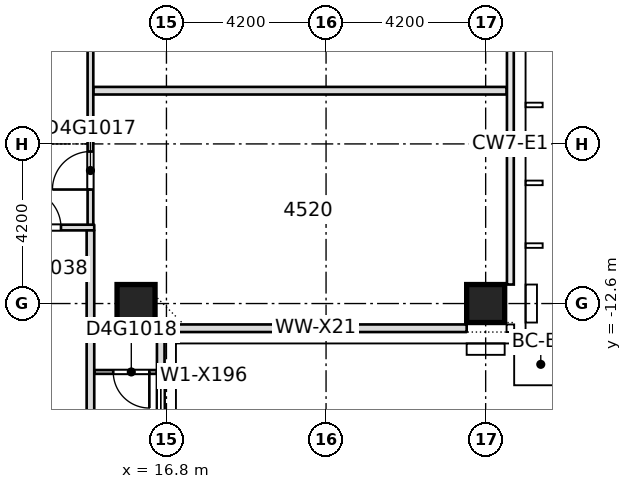
"""IFC4 building model, lengths in metres.
Left out: names, types, materials, properties, quantities, classifications, styles, units other than length and angle.
Written with IfcOpenShell. Run it as: python <this file> out.ifc"""

import sys

from ifc_helpers import new_model, si_unit, direction, frame, frame_2d, origin, origin_2d, place, context, subcontext, project, spatial, rectangle, extrude, element, fill, save


model = new_model("IFC4")
c1 = context("Model", 3, precision=1e-05, world=origin(), true_north=direction((0.0, 1.0)))
c2 = subcontext(c1, "Body", "Model", "MODEL_VIEW")
j1 = project(units=[si_unit("LENGTHUNIT", "METRE"), si_unit("PLANEANGLEUNIT", "RADIAN")], contexts=[c1])
p1 = place(None, origin())
s1 = spatial("IfcSite", under=j1, at=p1, CompositionType="ELEMENT")
p2 = place(p1, origin())
s2 = spatial("IfcBuilding", under=s1, at=p2, CompositionType="ELEMENT")
p3 = place(p2, frame((0.0, 0.0, 175.55)))
s3 = spatial("IfcBuildingStorey", under=s2, at=p3, CompositionType="ELEMENT", Elevation=175.55)
for number, where, z_axis, x_axis in (
    (1, (16.0, -12.6, -0.4), (0.0, 0.0, 1.0), (1.0, 0.0, 0.0)),
    (2, (25.2, -12.6, -0.4), (0.0, 0.0, 1.0), (1.0, 0.0, 0.0)),
):
    element("IfcColumn", number, at=place(p3, frame(where, z_axis=z_axis, x_axis=x_axis)), inside=s3, PredefinedType="COLUMN", context=c2, shape_type="SweptSolid", body=[
        extrude(rectangle(XDim=1.0, YDim=1.0, at=origin_2d()), origin(), (0.0, 0.0, 1.0), 3.45),
    ])
p4 = place(p3, frame((14.9, -14.4, 0.0), z_axis=(0.0, 0.0, 1.0), x_axis=(1.0, 0.0, 0.0)))
e3 = element("IfcWall", 3, at=p4, inside=s3, PredefinedType="PARTITIONING", context=c2, shape_type="SweptSolid", body=[
    extrude(rectangle(XDim=1.65, YDim=0.1, at=frame_2d((0.825, 0.0))), origin(), (0.0, 0.0, 1.0), 3.05),
])
p5 = place(p4, frame((0.5, 0.0, 0.0)))
e4 = element("IfcOpeningElement", 4, at=p5, cuts=e3, PredefinedType="OPENING", context=c2, shape_type="SweptSolid", body=[
    extrude(rectangle(XDim=0.95, YDim=2.1, at=frame_2d((0.475, 1.05))), frame((0.0, 0.06, 0.0), z_axis=(0.0, -1.0, 0.0), x_axis=(1.0, 0.0, 0.0)), (0.0, 0.0, 1.0), 0.12),
])
p6 = place(p3, frame((4.5, -10.6, 0.0), z_axis=(0.0, 0.0, 1.0), x_axis=(1.0, 0.0, 0.0)))
e5 = element("IfcWall", 5, at=p6, inside=s3, PredefinedType="PARTITIONING", context=c2, shape_type="SweptSolid", body=[
    extrude(rectangle(XDim=10.4, YDim=0.15, at=frame_2d((5.2, 0.0))), origin(), (0.0, 0.0, 1.0), 3.05),
])
p7 = place(p6, frame((2.075, 0.0, 0.0)))
e6 = element("IfcOpeningElement", 6, at=p7, cuts=e5, PredefinedType="OPENING", context=c2, shape_type="SweptSolid", body=[
    extrude(rectangle(XDim=1.0, YDim=2.1, at=frame_2d((0.5, 1.05))), frame((0.0, 0.085, 0.0), z_axis=(0.0, -1.0, 0.0), x_axis=(1.0, 0.0, 0.0)), (0.0, 0.0, 1.0), 0.17),
])
p8 = place(p6, frame((5.35, 0.0, 0.0)))
e7 = element("IfcOpeningElement", 7, at=p8, cuts=e5, PredefinedType="OPENING", context=c2, shape_type="SweptSolid", body=[
    extrude(rectangle(XDim=1.1, YDim=2.1, at=frame_2d((0.55, 1.05))), frame((0.0, 0.085, 0.0), z_axis=(0.0, -1.0, 0.0), x_axis=(1.0, 0.0, 0.0)), (0.0, 0.0, 1.0), 0.17),
])
p9 = place(p6, frame((8.525, 0.0, 0.0)))
e8 = element("IfcOpeningElement", 8, at=p9, cuts=e5, PredefinedType="OPENING", context=c2, shape_type="SweptSolid", body=[
    extrude(rectangle(XDim=1.0, YDim=2.1, at=frame_2d((0.5, 1.05))), frame((0.0, 0.085, 0.0), z_axis=(0.0, -1.0, 0.0), x_axis=(1.0, 0.0, 0.0)), (0.0, 0.0, 1.0), 0.17),
])
p10 = place(p3, frame((14.875, -7.0, 0.0), z_axis=(0.0, 0.0, 1.0), x_axis=(1.0, 0.0, 0.0)))
e9 = element("IfcWall", 9, at=p10, inside=s3, PredefinedType="PARTITIONING", context=c2, shape_type="SweptSolid", body=[
    extrude(rectangle(XDim=10.875, YDim=0.2, at=frame_2d((5.438, 0.0))), origin(), (0.0, 0.0, 1.0), 3.05),
])
p11 = place(p3, frame((14.8, -19.3, 0.0), z_axis=(0.0, 0.0, 1.0), x_axis=(0.0, 1.0, 0.0)))
e10 = element("IfcWall", 10, at=p11, inside=s3, PredefinedType="PARTITIONING", context=c2, shape_type="SweptSolid", body=[
    extrude(rectangle(XDim=8.625, YDim=0.2, at=frame_2d((4.312, 0.0))), origin(), (0.0, 0.0, 1.0), 3.05),
])
p12 = place(p3, frame((14.8, -10.525, 0.0), z_axis=(0.0, 0.0, 1.0), x_axis=(0.0, 1.0, 0.0)))
e11 = element("IfcWall", 11, at=p12, inside=s3, PredefinedType="PARTITIONING", context=c2, shape_type="SweptSolid", body=[
    extrude(rectangle(XDim=18.925, YDim=0.15, at=frame_2d((9.462, 0.0))), origin(), (0.0, 0.0, 1.0), 3.05),
])
p13 = place(p12, frame((0.925, 0.0, 0.0)))
e12 = element("IfcOpeningElement", 12, at=p13, cuts=e11, PredefinedType="OPENING", context=c2, shape_type="SweptSolid", body=[
    extrude(rectangle(XDim=1.0, YDim=2.1, at=frame_2d((0.5, 1.05))), frame((0.0, 0.085, 0.0), z_axis=(0.0, -1.0, 0.0), x_axis=(1.0, 0.0, 0.0)), (0.0, 0.0, 1.0), 0.17),
])
p14 = place(p12, frame((15.95, 0.0, 0.0)))
e13 = element("IfcOpeningElement", 13, at=p14, cuts=e11, PredefinedType="OPENING", context=c2, shape_type="SweptSolid", body=[
    extrude(rectangle(XDim=1.0, YDim=2.1, at=frame_2d((0.5, 1.05))), frame((0.0, 0.085, 0.0), z_axis=(0.0, -1.0, 0.0), x_axis=(1.0, 0.0, 0.0)), (0.0, 0.0, 1.0), 0.17),
])
p15 = place(p12, frame((9.975, 0.0, 0.0)))
e14 = element("IfcOpeningElement", 14, at=p15, cuts=e11, PredefinedType="OPENING", context=c2, shape_type="SweptSolid", body=[
    extrude(rectangle(XDim=1.1, YDim=2.1, at=frame_2d((0.55, 1.05))), frame((0.0, 0.085, 0.0), z_axis=(0.0, -1.0, 0.0), x_axis=(1.0, 0.0, 0.0)), (0.0, 0.0, 1.0), 0.17),
])
p16 = place(p12, frame((4.825, 0.0, 0.0)))
e15 = element("IfcOpeningElement", 15, at=p16, cuts=e11, PredefinedType="OPENING", context=c2, shape_type="SweptSolid", body=[
    extrude(rectangle(XDim=1.0, YDim=2.1, at=frame_2d((0.5, 1.05))), frame((0.0, 0.085, 0.0), z_axis=(0.0, -1.0, 0.0), x_axis=(1.0, 0.0, 0.0)), (0.0, 0.0, 1.0), 0.17),
])
p17 = place(p3, frame((16.65, -20.5, 0.0), z_axis=(0.0, 0.0, 1.0), x_axis=(0.0, 1.0, 0.0)))
e16 = element("IfcWall", 16, at=p17, inside=s3, PredefinedType="STANDARD", context=c2, shape_type="SweptSolid", body=[
    extrude(rectangle(XDim=7.15, YDim=0.2, at=frame_2d((3.575, 0.0))), origin(), (0.0, 0.0, 1.0), 3.05),
])
p18 = place(p17, frame((1.32, 0.0, 0.2)))
e17 = element("IfcOpeningElement", 17, at=p18, cuts=e16, PredefinedType="OPENING", context=c2, shape_type="SweptSolid", body=[
    extrude(rectangle(XDim=1.8, YDim=2.65, at=frame_2d((0.9, 1.325))), frame((0.0, 0.11, 0.0), z_axis=(0.0, -1.0, 0.0), x_axis=(1.0, 0.0, 0.0)), (0.0, 0.0, 1.0), 0.22),
])
p19 = place(p17, frame((3.975, 0.0, 0.2)))
e18 = element("IfcOpeningElement", 18, at=p19, cuts=e16, PredefinedType="OPENING", context=c2, shape_type="SweptSolid", body=[
    extrude(rectangle(XDim=1.8, YDim=2.65, at=frame_2d((0.9, 1.325))), frame((0.0, 0.11, 0.0), z_axis=(0.0, -1.0, 0.0), x_axis=(1.0, 0.0, 0.0)), (0.0, 0.0, 1.0), 0.22),
])
p20 = place(p3, frame((16.75, -13.25, 0.0), z_axis=(0.0, 0.0, 1.0), x_axis=(1.0, 0.0, 0.0)))
e19 = element("IfcWall", 19, at=p20, inside=s3, PredefinedType="STANDARD", context=c2, shape_type="SweptSolid", body=[
    extrude(rectangle(XDim=7.95, YDim=0.2, at=frame_2d((3.975, 0.0))), origin(), (0.0, 0.0, 1.0), 3.05),
])
p21 = place(p13, origin())
e20 = element("IfcDoor", 20, at=p21, inside=s3, OperationType="SINGLE_SWING_RIGHT", PredefinedType="DOOR", context=c2, shape_type="SweptSolid", body=[
    extrude(rectangle(XDim=1.0, YDim=2.1, at=frame_2d((0.5, 1.05))), frame((0.0, 0.025, 0.0), z_axis=(0.0, -1.0, 0.0), x_axis=(1.0, 0.0, 0.0)), (0.0, 0.0, 1.0), 0.05),
])
fill(e12, e20)
p22 = place(p5, origin())
e21 = element("IfcDoor", 21, at=p22, inside=s3, OperationType="SINGLE_SWING_RIGHT", PredefinedType="DOOR", context=c2, shape_type="SweptSolid", body=[
    extrude(rectangle(XDim=0.95, YDim=2.1, at=frame_2d((0.475, 1.05))), frame((0.0, 0.025, 0.0), z_axis=(0.0, -1.0, 0.0), x_axis=(1.0, 0.0, 0.0)), (0.0, 0.0, 1.0), 0.05),
])
fill(e4, e21)
p23 = place(p9, origin())
e22 = element("IfcDoor", 22, at=p23, inside=s3, OperationType="SINGLE_SWING_LEFT", PredefinedType="DOOR", context=c2, shape_type="SweptSolid", body=[
    extrude(rectangle(XDim=1.0, YDim=2.1, at=frame_2d((0.5, 1.05))), frame((0.0, 0.025, 0.0), z_axis=(0.0, -1.0, 0.0), x_axis=(1.0, 0.0, 0.0)), (0.0, 0.0, 1.0), 0.05),
])
fill(e8, e22)
p24 = place(p19, origin())
e23 = element("IfcWindow", 23, at=p24, inside=s3, PartitioningType="SINGLE_PANEL", PredefinedType="WINDOW", context=c2, shape_type="SweptSolid", body=[
    extrude(rectangle(XDim=1.8, YDim=2.65, at=frame_2d((0.9, 1.325))), frame((0.0, 0.03, 0.0), z_axis=(0.0, -1.0, 0.0), x_axis=(1.0, 0.0, 0.0)), (0.0, 0.0, 1.0), 0.06),
])
fill(e18, e23)
save(model, sys.argv[1])
